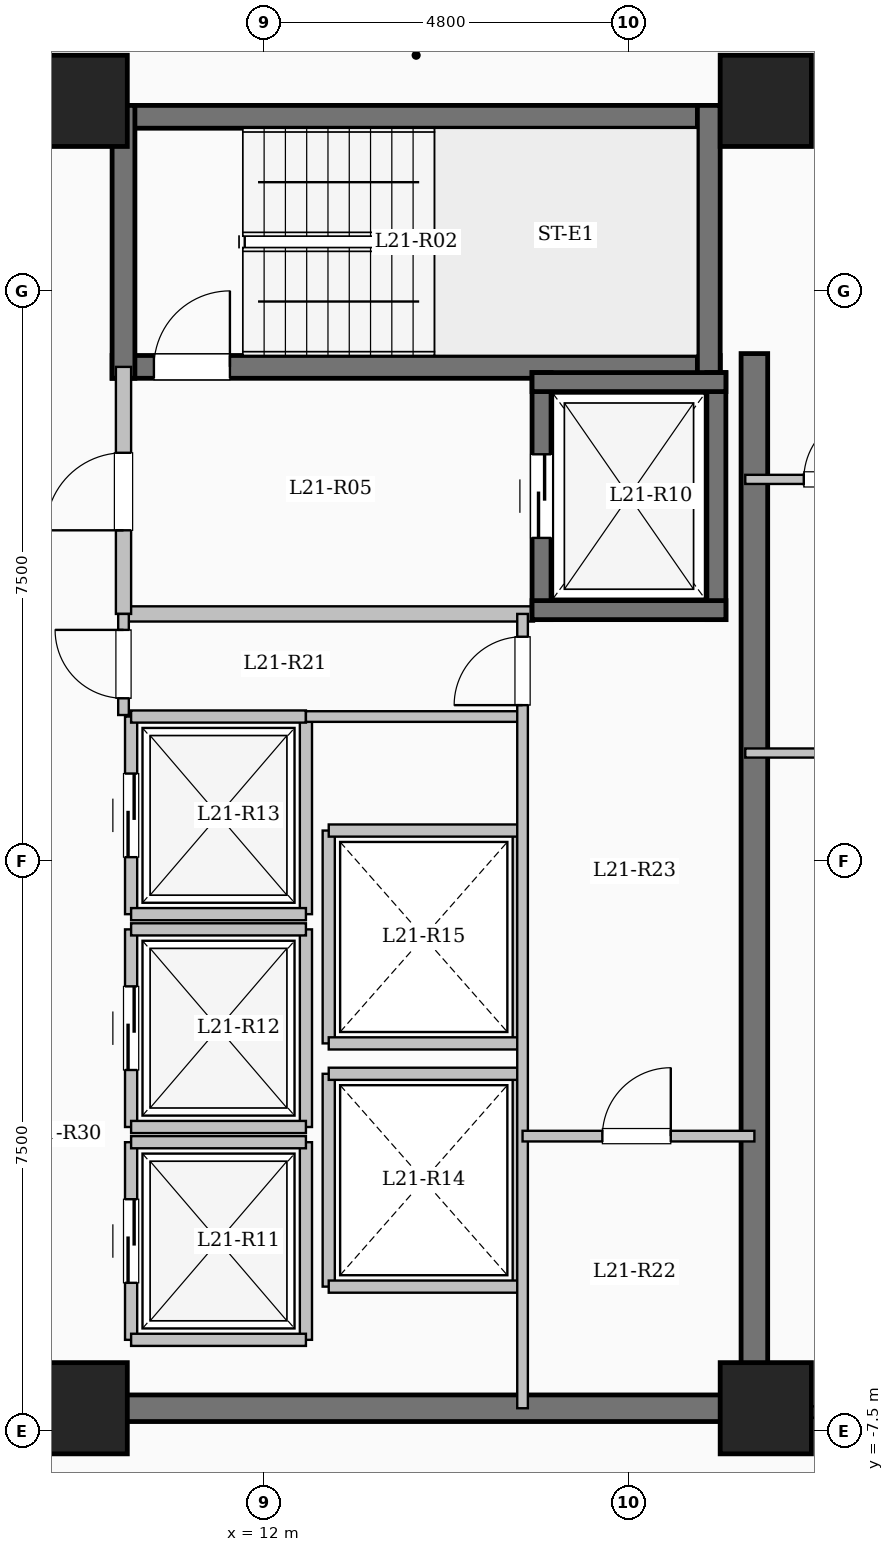
"""IFC4 building model, lengths in metres.
Left out: names, types, materials, properties, quantities, classifications, styles, units other than length and angle.
Written with IfcOpenShell. Run it as: python <this file> out.ifc"""

import sys

from ifc_helpers import new_model, si_unit, direction, frame, frame_2d, origin, origin_2d, place, context, subcontext, project, spatial, rectangle, extrude, element, fill, save


model = new_model("IFC4")
c1 = context("Model", 3, precision=1e-05, world=origin(), true_north=direction((0.0, 1.0)))
c2 = subcontext(c1, "Body", "Model", "MODEL_VIEW")
j1 = project(units=[si_unit("LENGTHUNIT", "METRE"), si_unit("PLANEANGLEUNIT", "RADIAN")], contexts=[c1])
p1 = place(None, origin())
s1 = spatial("IfcSite", under=j1, at=p1, CompositionType="ELEMENT")
p2 = place(p1, origin())
s2 = spatial("IfcBuilding", under=s1, at=p2, CompositionType="ELEMENT")
p3 = place(p2, frame((0.0, 0.0, 81.65)))
s3 = spatial("IfcBuildingStorey", under=s2, at=p3, CompositionType="ELEMENT", Elevation=81.65)
for number, where, z_axis, x_axis in (
    (1, (9.6, -7.2, 0.0), (0.0, 0.0, 1.0), (1.0, 0.0, 0.0)),
    (2, (9.6, 10.0, 0.0), (0.0, 0.0, 1.0), (1.0, 0.0, 0.0)),
    (3, (18.6, -7.2, 0.0), (0.0, 0.0, 1.0), (1.0, 0.0, 0.0)),
    (4, (18.6, 10.0, 0.0), (0.0, 0.0, 1.0), (1.0, 0.0, 0.0)),
):
    element("IfcColumn", number, at=place(p3, frame(where, z_axis=z_axis, x_axis=x_axis)), inside=s3, PredefinedType="COLUMN", context=c2, shape_type="SweptSolid", body=[
        extrude(rectangle(XDim=1.2, YDim=1.2, at=origin_2d()), origin(), (0.0, 0.0, 1.0), 3.35),
    ])
p4 = place(p3, frame((10.0, 9.79, 0.0), z_axis=(0.0, 0.0, 1.0), x_axis=(1.0, 0.0, 0.0)))
e5 = element("IfcWall", 5, at=p4, inside=s3, PredefinedType="SHEAR", context=c2, shape_type="SweptSolid", body=[
    extrude(rectangle(XDim=8.0, YDim=0.3, at=frame_2d((4.0, 0.0))), origin(), (0.0, 0.0, 1.0), 3.35),
])
p5 = place(p3, frame((10.0, 6.5, 0.0), z_axis=(0.0, 0.0, 1.0), x_axis=(1.0, 0.0, 0.0)))
e6 = element("IfcWall", 6, at=p5, inside=s3, PredefinedType="SHEAR", context=c2, shape_type="SweptSolid", body=[
    extrude(rectangle(XDim=8.0, YDim=0.3, at=frame_2d((4.0, 0.0))), origin(), (0.0, 0.0, 1.0), 3.35),
])
p6 = place(p5, frame((0.55, 0.0, 0.0)))
e7 = element("IfcOpeningElement", 7, at=p6, cuts=e6, PredefinedType="OPENING", context=c2, shape_type="SweptSolid", body=[
    extrude(rectangle(XDim=1.0, YDim=2.15, at=frame_2d((0.5, 1.075))), frame((0.0, 0.16, 0.0), z_axis=(0.0, -1.0, 0.0), x_axis=(1.0, 0.0, 0.0)), (0.0, 0.0, 1.0), 0.32),
])
for number, where, z_axis, x_axis in (
    (8, (10.15, 6.35, 0.0), (0.0, 0.0, 1.0), (0.0, 1.0, 0.0)),
    (9, (17.85, 6.35, 0.0), (0.0, 0.0, 1.0), (0.0, 1.0, 0.0)),
):
    element("IfcWall", number, at=place(p3, frame(where, z_axis=z_axis, x_axis=x_axis)), inside=s3, PredefinedType="SHEAR", context=c2, shape_type="SweptSolid", body=[
        extrude(rectangle(XDim=3.59, YDim=0.3, at=frame_2d((1.795, 0.0))), origin(), (0.0, 0.0, 1.0), 3.35),
    ])
p7 = place(p3, frame((10.15, 3.25, 0.0), z_axis=(0.0, 0.0, 1.0), x_axis=(1.0, 0.0, 0.0)))
e10 = element("IfcWall", 10, at=p7, inside=s3, PredefinedType="SOLIDWALL", context=c2, shape_type="SweptSolid", body=[
    extrude(rectangle(XDim=5.4, YDim=0.2, at=frame_2d((2.7, 0.0))), origin(), (0.0, 0.0, 1.0), 3.1),
])
p8 = place(p3, frame((10.15, 3.25, 0.0), z_axis=(0.0, 0.0, 1.0), x_axis=(0.0, 1.0, 0.0)))
e11 = element("IfcWall", 11, at=p8, inside=s3, PredefinedType="SOLIDWALL", context=c2, shape_type="SweptSolid", body=[
    extrude(rectangle(XDim=3.25, YDim=0.2, at=frame_2d((1.625, 0.0))), origin(), (0.0, 0.0, 1.0), 3.1),
])
p9 = place(p8, frame((1.1, 0.0, 0.0)))
e12 = element("IfcOpeningElement", 12, at=p9, cuts=e11, PredefinedType="OPENING", context=c2, shape_type="SweptSolid", body=[
    extrude(rectangle(XDim=1.02, YDim=2.15, at=frame_2d((0.51, 1.075))), frame((0.0, 0.11, 0.0), z_axis=(0.0, -1.0, 0.0), x_axis=(1.0, 0.0, 0.0)), (0.0, 0.0, 1.0), 0.22),
])
p10 = place(p3, frame((15.65, 3.175, 0.0), z_axis=(0.0, 0.0, 1.0), x_axis=(0.0, 1.0, 0.0)))
e13 = element("IfcWall", 13, at=p10, inside=s3, PredefinedType="SHEAR", context=c2, shape_type="SweptSolid", body=[
    extrude(rectangle(XDim=3.25, YDim=0.25, at=frame_2d((1.625, 0.0))), origin(), (0.0, 0.0, 1.0), 3.35),
])
p11 = place(p10, frame((1.075, 0.0, 0.0)))
e14 = element("IfcOpeningElement", 14, at=p11, cuts=e13, PredefinedType="OPENING", context=c2, shape_type="SweptSolid", body=[
    extrude(rectangle(XDim=1.1, YDim=2.15, at=frame_2d((0.55, 1.075))), frame((0.0, 0.135, 0.0), z_axis=(0.0, -1.0, 0.0), x_axis=(1.0, 0.0, 0.0)), (0.0, 0.0, 1.0), 0.27),
])
p12 = place(p3, frame((17.95, 3.175, 0.0), z_axis=(0.0, 0.0, 1.0), x_axis=(0.0, 1.0, 0.0)))
e15 = element("IfcWall", 15, at=p12, inside=s3, PredefinedType="SHEAR", context=c2, shape_type="SweptSolid", body=[
    extrude(rectangle(XDim=3.25, YDim=0.25, at=frame_2d((1.625, 0.0))), origin(), (0.0, 0.0, 1.0), 3.35),
])
for number, where, z_axis, x_axis in (
    (16, (15.525, 3.3, 0.0), (0.0, 0.0, 1.0), (1.0, 0.0, 0.0)),
    (17, (15.525, 6.3, 0.0), (0.0, 0.0, 1.0), (1.0, 0.0, 0.0)),
):
    element("IfcWall", number, at=place(p3, frame(where, z_axis=z_axis, x_axis=x_axis)), inside=s3, PredefinedType="SHEAR", context=c2, shape_type="SweptSolid", body=[
        extrude(rectangle(XDim=2.55, YDim=0.25, at=frame_2d((1.275, 0.0))), origin(), (0.0, 0.0, 1.0), 3.35),
    ])
p13 = place(p3, frame((10.25, -6.3, 0.0), z_axis=(0.0, 0.0, 1.0), x_axis=(0.0, 1.0, 0.0)))
e18 = element("IfcWall", 18, at=p13, inside=s3, PredefinedType="SOLIDWALL", context=c2, shape_type="SweptSolid", body=[
    extrude(rectangle(XDim=2.6, YDim=0.16, at=frame_2d((1.3, 0.0))), origin(), (0.0, 0.0, 1.0), 3.1),
])
p14 = place(p13, frame((0.75, 0.0, 0.0)))
e19 = element("IfcOpeningElement", 19, at=p14, cuts=e18, PredefinedType="OPENING", context=c2, shape_type="SweptSolid", body=[
    extrude(rectangle(XDim=1.1, YDim=2.15, at=frame_2d((0.55, 1.075))), frame((0.0, 0.09, 0.0), z_axis=(0.0, -1.0, 0.0), x_axis=(1.0, 0.0, 0.0)), (0.0, 0.0, 1.0), 0.18),
])
p15 = place(p3, frame((12.55, -6.3, 0.0), z_axis=(0.0, 0.0, 1.0), x_axis=(0.0, 1.0, 0.0)))
e20 = element("IfcWall", 20, at=p15, inside=s3, PredefinedType="SOLIDWALL", context=c2, shape_type="SweptSolid", body=[
    extrude(rectangle(XDim=2.6, YDim=0.16, at=frame_2d((1.3, 0.0))), origin(), (0.0, 0.0, 1.0), 3.1),
])
for number, where, z_axis, x_axis in (
    (21, (10.25, -6.3, 0.0), (0.0, 0.0, 1.0), (1.0, 0.0, 0.0)),
    (22, (10.25, -3.7, 0.0), (0.0, 0.0, 1.0), (1.0, 0.0, 0.0)),
):
    element("IfcWall", number, at=place(p3, frame(where, z_axis=z_axis, x_axis=x_axis)), inside=s3, PredefinedType="SOLIDWALL", context=c2, shape_type="SweptSolid", body=[
        extrude(rectangle(XDim=2.3, YDim=0.16, at=frame_2d((1.15, 0.0))), origin(), (0.0, 0.0, 1.0), 3.1),
    ])
p16 = place(p3, frame((10.25, -3.5, 0.0), z_axis=(0.0, 0.0, 1.0), x_axis=(0.0, 1.0, 0.0)))
e23 = element("IfcWall", 23, at=p16, inside=s3, PredefinedType="SOLIDWALL", context=c2, shape_type="SweptSolid", body=[
    extrude(rectangle(XDim=2.6, YDim=0.16, at=frame_2d((1.3, 0.0))), origin(), (0.0, 0.0, 1.0), 3.1),
])
p17 = place(p16, frame((0.75, 0.0, 0.0)))
e24 = element("IfcOpeningElement", 24, at=p17, cuts=e23, PredefinedType="OPENING", context=c2, shape_type="SweptSolid", body=[
    extrude(rectangle(XDim=1.1, YDim=2.15, at=frame_2d((0.55, 1.075))), frame((0.0, 0.09, 0.0), z_axis=(0.0, -1.0, 0.0), x_axis=(1.0, 0.0, 0.0)), (0.0, 0.0, 1.0), 0.18),
])
p18 = place(p3, frame((12.55, -3.5, 0.0), z_axis=(0.0, 0.0, 1.0), x_axis=(0.0, 1.0, 0.0)))
e25 = element("IfcWall", 25, at=p18, inside=s3, PredefinedType="SOLIDWALL", context=c2, shape_type="SweptSolid", body=[
    extrude(rectangle(XDim=2.6, YDim=0.16, at=frame_2d((1.3, 0.0))), origin(), (0.0, 0.0, 1.0), 3.1),
])
for number, where, z_axis, x_axis in (
    (26, (10.25, -3.5, 0.0), (0.0, 0.0, 1.0), (1.0, 0.0, 0.0)),
    (27, (10.25, -0.9, 0.0), (0.0, 0.0, 1.0), (1.0, 0.0, 0.0)),
):
    element("IfcWall", number, at=place(p3, frame(where, z_axis=z_axis, x_axis=x_axis)), inside=s3, PredefinedType="SOLIDWALL", context=c2, shape_type="SweptSolid", body=[
        extrude(rectangle(XDim=2.3, YDim=0.16, at=frame_2d((1.15, 0.0))), origin(), (0.0, 0.0, 1.0), 3.1),
    ])
p19 = place(p3, frame((10.25, -0.7, 0.0), z_axis=(0.0, 0.0, 1.0), x_axis=(0.0, 1.0, 0.0)))
e28 = element("IfcWall", 28, at=p19, inside=s3, PredefinedType="SOLIDWALL", context=c2, shape_type="SweptSolid", body=[
    extrude(rectangle(XDim=2.6, YDim=0.16, at=frame_2d((1.3, 0.0))), origin(), (0.0, 0.0, 1.0), 3.1),
])
p20 = place(p19, frame((0.75, 0.0, 0.0)))
e29 = element("IfcOpeningElement", 29, at=p20, cuts=e28, PredefinedType="OPENING", context=c2, shape_type="SweptSolid", body=[
    extrude(rectangle(XDim=1.1, YDim=2.15, at=frame_2d((0.55, 1.075))), frame((0.0, 0.09, 0.0), z_axis=(0.0, -1.0, 0.0), x_axis=(1.0, 0.0, 0.0)), (0.0, 0.0, 1.0), 0.18),
])
p21 = place(p3, frame((12.55, -0.7, 0.0), z_axis=(0.0, 0.0, 1.0), x_axis=(0.0, 1.0, 0.0)))
e30 = element("IfcWall", 30, at=p21, inside=s3, PredefinedType="SOLIDWALL", context=c2, shape_type="SweptSolid", body=[
    extrude(rectangle(XDim=2.6, YDim=0.16, at=frame_2d((1.3, 0.0))), origin(), (0.0, 0.0, 1.0), 3.1),
])
for number, where, z_axis, x_axis in (
    (31, (10.25, -0.7, 0.0), (0.0, 0.0, 1.0), (1.0, 0.0, 0.0)),
    (32, (10.25, 1.9, 0.0), (0.0, 0.0, 1.0), (1.0, 0.0, 0.0)),
):
    element("IfcWall", number, at=place(p3, frame(where, z_axis=z_axis, x_axis=x_axis)), inside=s3, PredefinedType="SOLIDWALL", context=c2, shape_type="SweptSolid", body=[
        extrude(rectangle(XDim=2.3, YDim=0.16, at=frame_2d((1.15, 0.0))), origin(), (0.0, 0.0, 1.0), 3.1),
    ])
for number, where, z_axis, x_axis in (
    (33, (12.85, -5.6, 0.0), (0.0, 0.0, 1.0), (0.0, 1.0, 0.0)),
    (34, (15.35, -5.6, 0.0), (0.0, 0.0, 1.0), (0.0, 1.0, 0.0)),
):
    element("IfcWall", number, at=place(p3, frame(where, z_axis=z_axis, x_axis=x_axis)), inside=s3, PredefinedType="SOLIDWALL", context=c2, shape_type="SweptSolid", body=[
        extrude(rectangle(XDim=2.8, YDim=0.16, at=frame_2d((1.4, 0.0))), origin(), (0.0, 0.0, 1.0), 3.1),
    ])
for number, where, z_axis, x_axis in (
    (35, (12.85, -5.6, 0.0), (0.0, 0.0, 1.0), (1.0, 0.0, 0.0)),
    (36, (12.85, -2.8, 0.0), (0.0, 0.0, 1.0), (1.0, 0.0, 0.0)),
):
    element("IfcWall", number, at=place(p3, frame(where, z_axis=z_axis, x_axis=x_axis)), inside=s3, PredefinedType="SOLIDWALL", context=c2, shape_type="SweptSolid", body=[
        extrude(rectangle(XDim=2.5, YDim=0.16, at=frame_2d((1.25, 0.0))), origin(), (0.0, 0.0, 1.0), 3.1),
    ])
for number, where, z_axis, x_axis in (
    (37, (12.85, -2.4, 0.0), (0.0, 0.0, 1.0), (0.0, 1.0, 0.0)),
    (38, (15.35, -2.4, 0.0), (0.0, 0.0, 1.0), (0.0, 1.0, 0.0)),
):
    element("IfcWall", number, at=place(p3, frame(where, z_axis=z_axis, x_axis=x_axis)), inside=s3, PredefinedType="SOLIDWALL", context=c2, shape_type="SweptSolid", body=[
        extrude(rectangle(XDim=2.8, YDim=0.16, at=frame_2d((1.4, 0.0))), origin(), (0.0, 0.0, 1.0), 3.1),
    ])
for number, where, z_axis, x_axis in (
    (39, (12.85, -2.4, 0.0), (0.0, 0.0, 1.0), (1.0, 0.0, 0.0)),
    (40, (12.85, 0.4, 0.0), (0.0, 0.0, 1.0), (1.0, 0.0, 0.0)),
):
    element("IfcWall", number, at=place(p3, frame(where, z_axis=z_axis, x_axis=x_axis)), inside=s3, PredefinedType="SOLIDWALL", context=c2, shape_type="SweptSolid", body=[
        extrude(rectangle(XDim=2.5, YDim=0.16, at=frame_2d((1.25, 0.0))), origin(), (0.0, 0.0, 1.0), 3.1),
    ])
p22 = place(p3, frame((18.45, -7.375, 0.0), z_axis=(0.0, 0.0, 1.0), x_axis=(0.0, 1.0, 0.0)))
e41 = element("IfcWall", 41, at=p22, inside=s3, PredefinedType="SHEAR", context=c2, shape_type="SweptSolid", body=[
    extrude(rectangle(XDim=14.05, YDim=0.35, at=frame_2d((7.025, 0.0))), origin(), (0.0, 0.0, 1.0), 3.35),
])
p23 = place(p3, frame((10.075, -7.2, 0.0), z_axis=(0.0, 0.0, 1.0), x_axis=(1.0, 0.0, 0.0)))
e42 = element("IfcWall", 42, at=p23, inside=s3, PredefinedType="SHEAR", context=c2, shape_type="SweptSolid", body=[
    extrude(rectangle(XDim=8.55, YDim=0.35, at=frame_2d((4.275, 0.0))), origin(), (0.0, 0.0, 1.0), 3.35),
])
p24 = place(p3, frame((12.55, 1.9, 0.0), z_axis=(0.0, 0.0, 1.0), x_axis=(1.0, 0.0, 0.0)))
e43 = element("IfcWall", 43, at=p24, inside=s3, PredefinedType="PARTITIONING", context=c2, shape_type="SweptSolid", body=[
    extrude(rectangle(XDim=2.85, YDim=0.14, at=frame_2d((1.425, 0.0))), origin(), (0.0, 0.0, 1.0), 3.1),
])
p25 = place(p3, frame((10.15, 1.92, 0.0), z_axis=(0.0, 0.0, 1.0), x_axis=(0.0, 1.0, 0.0)))
e44 = element("IfcWall", 44, at=p25, inside=s3, PredefinedType="PARTITIONING", context=c2, shape_type="SweptSolid", body=[
    extrude(rectangle(XDim=1.33, YDim=0.14, at=frame_2d((0.665, 0.0))), origin(), (0.0, 0.0, 1.0), 3.1),
])
p26 = place(p25, frame((0.22, 0.0, 0.0)))
e45 = element("IfcOpeningElement", 45, at=p26, cuts=e44, PredefinedType="OPENING", context=c2, shape_type="SweptSolid", body=[
    extrude(rectangle(XDim=0.9, YDim=2.08, at=frame_2d((0.45, 1.04))), frame((0.0, 0.08, 0.0), z_axis=(0.0, -1.0, 0.0), x_axis=(1.0, 0.0, 0.0)), (0.0, 0.0, 1.0), 0.16),
])
p27 = place(p3, frame((15.4, -7.2, 0.0), z_axis=(0.0, 0.0, 1.0), x_axis=(0.0, 1.0, 0.0)))
e46 = element("IfcWall", 46, at=p27, inside=s3, PredefinedType="PARTITIONING", context=c2, shape_type="SweptSolid", body=[
    extrude(rectangle(XDim=10.45, YDim=0.14, at=frame_2d((5.225, 0.0))), origin(), (0.0, 0.0, 1.0), 3.1),
])
p28 = place(p27, frame((9.25, 0.0, 0.0)))
e47 = element("IfcOpeningElement", 47, at=p28, cuts=e46, PredefinedType="OPENING", context=c2, shape_type="SweptSolid", body=[
    extrude(rectangle(XDim=0.9, YDim=2.08, at=frame_2d((0.45, 1.04))), frame((0.0, 0.08, 0.0), z_axis=(0.0, -1.0, 0.0), x_axis=(1.0, 0.0, 0.0)), (0.0, 0.0, 1.0), 0.16),
])
p29 = place(p3, frame((15.4, -3.62, 0.0), z_axis=(0.0, 0.0, 1.0), x_axis=(1.0, 0.0, 0.0)))
e48 = element("IfcWall", 48, at=p29, inside=s3, PredefinedType="PARTITIONING", context=c2, shape_type="SweptSolid", body=[
    extrude(rectangle(XDim=3.05, YDim=0.14, at=frame_2d((1.525, 0.0))), origin(), (0.0, 0.0, 1.0), 3.1),
])
p30 = place(p29, frame((1.05, 0.0, 0.0)))
e49 = element("IfcOpeningElement", 49, at=p30, cuts=e48, PredefinedType="OPENING", context=c2, shape_type="SweptSolid", body=[
    extrude(rectangle(XDim=0.9, YDim=2.08, at=frame_2d((0.45, 1.04))), frame((0.0, 0.08, 0.0), z_axis=(0.0, -1.0, 0.0), x_axis=(1.0, 0.0, 0.0)), (0.0, 0.0, 1.0), 0.16),
])
p31 = place(p3, frame((18.45, -7.25, 0.0), z_axis=(0.0, 0.0, 1.0), x_axis=(1.0, 0.0, 0.0)))
e50 = element("IfcWall", 50, at=p31, inside=s3, PredefinedType="PARTITIONING", context=c2, shape_type="SweptSolid", body=[
    extrude(rectangle(XDim=8.43, YDim=0.15, at=frame_2d((4.215, 0.0))), origin(), (0.0, 0.0, 1.0), 3.1),
])
p32 = place(p31, frame((1.95, 0.0, 0.0)))
e51 = element("IfcOpeningElement", 51, at=p32, cuts=e50, PredefinedType="OPENING", context=c2, shape_type="SweptSolid", body=[
    extrude(rectangle(XDim=0.96, YDim=2.15, at=frame_2d((0.48, 1.075))), frame((0.0, 0.085, 0.0), z_axis=(0.0, -1.0, 0.0), x_axis=(1.0, 0.0, 0.0)), (0.0, 0.0, 1.0), 0.17),
])
p33 = place(p3, frame((18.33, 1.42, 0.0), z_axis=(0.0, 0.0, 1.0), x_axis=(1.0, 0.0, 0.0)))
e52 = element("IfcWall", 52, at=p33, inside=s3, PredefinedType="PARTITIONING", context=c2, shape_type="SweptSolid", body=[
    extrude(rectangle(XDim=8.67, YDim=0.12, at=frame_2d((4.335, 0.0))), origin(), (0.0, 0.0, 1.0), 3.1),
])
p34 = place(p33, frame((1.863, 0.0, 0.0)))
e53 = element("IfcOpeningElement", 53, at=p34, cuts=e52, PredefinedType="OPENING", context=c2, shape_type="SweptSolid", body=[
    extrude(rectangle(XDim=0.88, YDim=2.1, at=frame_2d((0.44, 1.05))), frame((0.0, 0.07, 0.0), z_axis=(0.0, -1.0, 0.0), x_axis=(1.0, 0.0, 0.0)), (0.0, 0.0, 1.0), 0.14),
])
p35 = place(p33, frame((6.028, 0.0, 0.0)))
e54 = element("IfcOpeningElement", 54, at=p35, cuts=e52, PredefinedType="OPENING", context=c2, shape_type="SweptSolid", body=[
    extrude(rectangle(XDim=0.88, YDim=2.1, at=frame_2d((0.44, 1.05))), frame((0.0, 0.07, 0.0), z_axis=(0.0, -1.0, 0.0), x_axis=(1.0, 0.0, 0.0)), (0.0, 0.0, 1.0), 0.14),
])
p36 = place(p3, frame((18.33, 5.02, 0.0), z_axis=(0.0, 0.0, 1.0), x_axis=(1.0, 0.0, 0.0)))
e55 = element("IfcWall", 55, at=p36, inside=s3, PredefinedType="PARTITIONING", context=c2, shape_type="SweptSolid", body=[
    extrude(rectangle(XDim=8.67, YDim=0.12, at=frame_2d((4.335, 0.0))), origin(), (0.0, 0.0, 1.0), 3.1),
])
p37 = place(p36, frame((0.77, 0.0, 0.0)))
e56 = element("IfcOpeningElement", 56, at=p37, cuts=e55, PredefinedType="OPENING", context=c2, shape_type="SweptSolid", body=[
    extrude(rectangle(XDim=0.88, YDim=2.1, at=frame_2d((0.44, 1.05))), frame((0.0, 0.07, 0.0), z_axis=(0.0, -1.0, 0.0), x_axis=(1.0, 0.0, 0.0)), (0.0, 0.0, 1.0), 0.14),
])
p38 = place(p6, origin())
e57 = element("IfcDoor", 57, at=p38, inside=s3, OperationType="SINGLE_SWING_RIGHT", PredefinedType="DOOR", context=c2, shape_type="SweptSolid", body=[
    extrude(rectangle(XDim=1.0, YDim=2.15, at=frame_2d((0.5, 1.075))), frame((0.0, 0.025, 0.0), z_axis=(0.0, -1.0, 0.0), x_axis=(1.0, 0.0, 0.0)), (0.0, 0.0, 1.0), 0.05),
])
fill(e7, e57)
p39 = place(p9, origin())
e58 = element("IfcDoor", 58, at=p39, inside=s3, OperationType="SINGLE_SWING_LEFT", PredefinedType="DOOR", context=c2, shape_type="SweptSolid", body=[
    extrude(rectangle(XDim=1.02, YDim=2.15, at=frame_2d((0.51, 1.075))), frame((0.0, 0.025, 0.0), z_axis=(0.0, -1.0, 0.0), x_axis=(1.0, 0.0, 0.0)), (0.0, 0.0, 1.0), 0.05),
])
fill(e12, e58)
p40 = place(p11, origin())
e59 = element("IfcDoor", 59, at=p40, inside=s3, OperationType="SLIDING_TO_LEFT", PredefinedType="DOOR", context=c2, shape_type="SweptSolid", body=[
    extrude(rectangle(XDim=1.1, YDim=2.15, at=frame_2d((0.55, 1.075))), frame((0.0, 0.025, 0.0), z_axis=(0.0, -1.0, 0.0), x_axis=(1.0, 0.0, 0.0)), (0.0, 0.0, 1.0), 0.05),
])
fill(e14, e59)
p41 = place(p14, origin())
e60 = element("IfcDoor", 60, at=p41, inside=s3, OperationType="SLIDING_TO_LEFT", PredefinedType="DOOR", context=c2, shape_type="SweptSolid", body=[
    extrude(rectangle(XDim=1.1, YDim=2.15, at=frame_2d((0.55, 1.075))), frame((0.0, 0.025, 0.0), z_axis=(0.0, -1.0, 0.0), x_axis=(1.0, 0.0, 0.0)), (0.0, 0.0, 1.0), 0.05),
])
fill(e19, e60)
p42 = place(p17, origin())
e61 = element("IfcDoor", 61, at=p42, inside=s3, OperationType="SLIDING_TO_LEFT", PredefinedType="DOOR", context=c2, shape_type="SweptSolid", body=[
    extrude(rectangle(XDim=1.1, YDim=2.15, at=frame_2d((0.55, 1.075))), frame((0.0, 0.025, 0.0), z_axis=(0.0, -1.0, 0.0), x_axis=(1.0, 0.0, 0.0)), (0.0, 0.0, 1.0), 0.05),
])
fill(e24, e61)
p43 = place(p20, origin())
e62 = element("IfcDoor", 62, at=p43, inside=s3, OperationType="SLIDING_TO_LEFT", PredefinedType="DOOR", context=c2, shape_type="SweptSolid", body=[
    extrude(rectangle(XDim=1.1, YDim=2.15, at=frame_2d((0.55, 1.075))), frame((0.0, 0.025, 0.0), z_axis=(0.0, -1.0, 0.0), x_axis=(1.0, 0.0, 0.0)), (0.0, 0.0, 1.0), 0.05),
])
fill(e29, e62)
p44 = place(p26, origin())
e63 = element("IfcDoor", 63, at=p44, inside=s3, OperationType="SINGLE_SWING_RIGHT", PredefinedType="DOOR", context=c2, shape_type="SweptSolid", body=[
    extrude(rectangle(XDim=0.9, YDim=2.08, at=frame_2d((0.45, 1.04))), frame((0.0, 0.025, 0.0), z_axis=(0.0, -1.0, 0.0), x_axis=(1.0, 0.0, 0.0)), (0.0, 0.0, 1.0), 0.05),
])
fill(e45, e63)
p45 = place(p28, origin())
e64 = element("IfcDoor", 64, at=p45, inside=s3, OperationType="SINGLE_SWING_LEFT", PredefinedType="DOOR", context=c2, shape_type="SweptSolid", body=[
    extrude(rectangle(XDim=0.9, YDim=2.08, at=frame_2d((0.45, 1.04))), frame((0.0, 0.025, 0.0), z_axis=(0.0, -1.0, 0.0), x_axis=(1.0, 0.0, 0.0)), (0.0, 0.0, 1.0), 0.05),
])
fill(e47, e64)
p46 = place(p30, origin())
e65 = element("IfcDoor", 65, at=p46, inside=s3, OperationType="SINGLE_SWING_RIGHT", PredefinedType="DOOR", context=c2, shape_type="SweptSolid", body=[
    extrude(rectangle(XDim=0.9, YDim=2.08, at=frame_2d((0.45, 1.04))), frame((0.0, 0.025, 0.0), z_axis=(0.0, -1.0, 0.0), x_axis=(1.0, 0.0, 0.0)), (0.0, 0.0, 1.0), 0.05),
])
fill(e49, e65)
p47 = place(p37, origin())
e66 = element("IfcDoor", 66, at=p47, inside=s3, OperationType="SINGLE_SWING_RIGHT", PredefinedType="DOOR", context=c2, shape_type="SweptSolid", body=[
    extrude(rectangle(XDim=0.88, YDim=2.1, at=frame_2d((0.44, 1.05))), frame((0.0, 0.025, 0.0), z_axis=(0.0, -1.0, 0.0), x_axis=(1.0, 0.0, 0.0)), (0.0, 0.0, 1.0), 0.05),
])
fill(e56, e66)
save(model, sys.argv[1])
